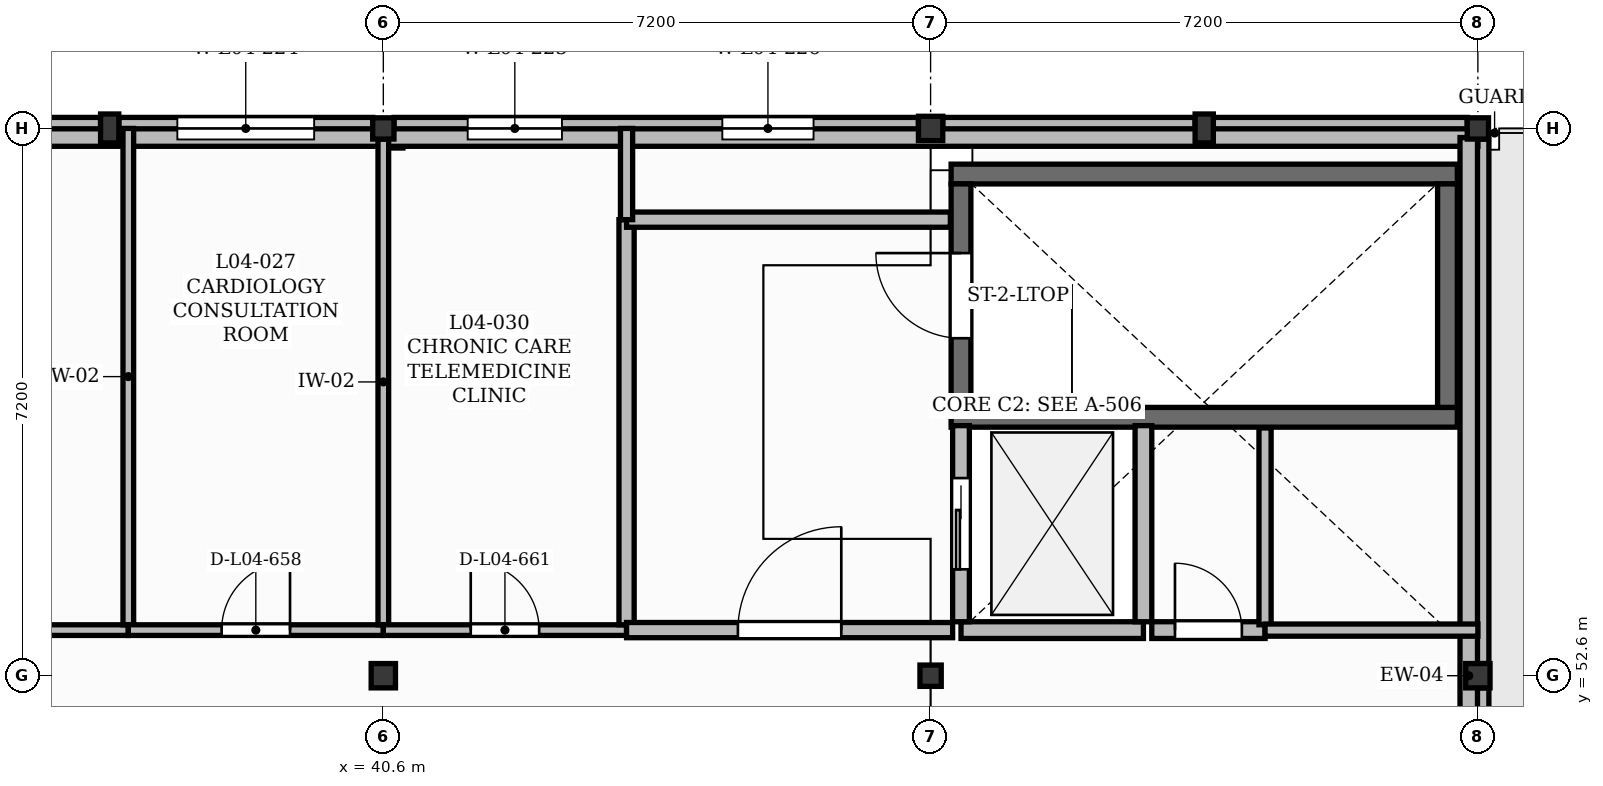
"""IFC4 building model, lengths in metres.
Left out: names, types, materials, properties, quantities, classifications, styles, units other than length and angle.
Written with IfcOpenShell. Run it as: python <this file> out.ifc"""

import sys

from ifc_helpers import new_model, si_unit, direction, frame, frame_2d, origin, origin_2d, place, context, subcontext, project, spatial, polyline, rectangle, outline, extrude, element, fill, save


model = new_model("IFC4")
c1 = context("Model", 3, precision=1e-05, world=origin(), true_north=direction((0.0, 1.0)))
c2 = subcontext(c1, "Body", "Model", "MODEL_VIEW")
j1 = project(units=[si_unit("LENGTHUNIT", "METRE"), si_unit("PLANEANGLEUNIT", "RADIAN")], contexts=[c1])
p1 = place(None, origin())
s1 = spatial("IfcSite", under=j1, at=p1, CompositionType="ELEMENT")
p2 = place(p1, origin())
s2 = spatial("IfcBuilding", under=s1, at=p2, CompositionType="ELEMENT")
p3 = place(p2, frame((0.0, 0.0, 17.4)))
s3 = spatial("IfcBuildingStorey", under=s2, at=p3, CompositionType="ELEMENT", Elevation=17.4)
p4 = place(p3, frame((40.6, 52.6, 0.0), z_axis=(0.0, 0.0, 1.0), x_axis=(1.0, 0.0, 0.0)))
e1 = element("IfcColumn", 1, at=p4, inside=s3, PredefinedType="COLUMN", context=c2, shape_type="SweptSolid", body=[
    extrude(rectangle(XDim=0.32, YDim=0.32, at=origin_2d()), origin(), (0.0, 0.0, 1.0), 3.95),
])
for number, where, z_axis, x_axis in (
    (2, (40.6, 59.8, 0.0), (0.0, 0.0, 1.0), (1.0, 0.0, 0.0)),
    (3, (47.8, 52.6, 0.0), (0.0, 0.0, 1.0), (1.0, 0.0, 0.0)),
):
    element("IfcColumn", number, at=place(p3, frame(where, z_axis=z_axis, x_axis=x_axis)), inside=s3, PredefinedType="COLUMN", context=c2, shape_type="SweptSolid", body=[
        extrude(rectangle(XDim=0.28, YDim=0.28, at=origin_2d()), origin(), (0.0, 0.0, 1.0), 3.95),
    ])
for number, where, z_axis, x_axis in (
    (4, (47.8, 59.8, 0.0), (0.0, 0.0, 1.0), (1.0, 0.0, 0.0)),
    (5, (55.0, 52.6, 0.0), (0.0, 0.0, 1.0), (1.0, 0.0, 0.0)),
):
    element("IfcColumn", number, at=place(p3, frame(where, z_axis=z_axis, x_axis=x_axis)), inside=s3, PredefinedType="COLUMN", context=c2, shape_type="SweptSolid", body=[
        extrude(rectangle(XDim=0.32, YDim=0.32, at=origin_2d()), origin(), (0.0, 0.0, 1.0), 3.95),
    ])
p5 = place(p3, frame((55.0, 59.8, 0.0), z_axis=(0.0, 0.0, 1.0), x_axis=(1.0, 0.0, 0.0)))
e6 = element("IfcColumn", 6, at=p5, inside=s3, PredefinedType="COLUMN", context=c2, shape_type="SweptSolid", body=[
    extrude(rectangle(XDim=0.28, YDim=0.28, at=origin_2d()), origin(), (0.0, 0.0, 1.0), 3.95),
])
for number, where, z_axis, x_axis in (
    (7, (37.0, 59.8, 0.0), (0.0, 0.0, 1.0), (1.0, 0.0, 0.0)),
    (8, (51.4, 59.8, 0.0), (0.0, 0.0, 1.0), (1.0, 0.0, 0.0)),
):
    element("IfcColumn", number, at=place(p3, frame(where, z_axis=z_axis, x_axis=x_axis)), inside=s3, PredefinedType="PILASTER", context=c2, shape_type="SweptSolid", body=[
        extrude(rectangle(XDim=0.24, YDim=0.38, at=origin_2d()), origin(), (0.0, 0.0, 1.0), 3.95),
    ])
p6 = place(p3, frame((33.56, 59.8, 0.0), z_axis=(0.0, 0.0, 1.0), x_axis=(1.0, 0.0, 0.0)))
e9 = element("IfcWall", 9, at=p6, inside=s3, PredefinedType="SOLIDWALL", context=c2, shape_type="SweptSolid", body=[
    extrude(rectangle(XDim=3.32, YDim=0.29, at=frame_2d((1.66, 0.0))), origin(), (0.0, 0.0, 1.0), 3.49),
])
p7 = place(p6, frame((0.83, 0.0, 1.0)))
e10 = element("IfcOpeningElement", 10, at=p7, cuts=e9, PredefinedType="OPENING", context=c2, shape_type="SweptSolid", body=[
    extrude(rectangle(XDim=1.66, YDim=1.8, at=frame_2d((0.83, 0.9))), frame((0.0, 0.155, 0.0), z_axis=(0.0, -1.0, 0.0), x_axis=(1.0, 0.0, 0.0)), (0.0, 0.0, 1.0), 0.31),
])
p8 = place(p3, frame((37.12, 59.8, 0.0), z_axis=(0.0, 0.0, 1.0), x_axis=(1.0, 0.0, 0.0)))
e11 = element("IfcWall", 11, at=p8, inside=s3, PredefinedType="SOLIDWALL", context=c2, shape_type="SweptSolid", body=[
    extrude(rectangle(XDim=3.34, YDim=0.29, at=frame_2d((1.67, 0.0))), origin(), (0.0, 0.0, 1.0), 3.49),
])
p9 = place(p8, frame((0.77, 0.0, 1.0)))
e12 = element("IfcOpeningElement", 12, at=p9, cuts=e11, PredefinedType="OPENING", context=c2, shape_type="SweptSolid", body=[
    extrude(rectangle(XDim=1.8, YDim=1.8, at=frame_2d((0.9, 0.9))), frame((0.0, 0.155, 0.0), z_axis=(0.0, -1.0, 0.0), x_axis=(1.0, 0.0, 0.0)), (0.0, 0.0, 1.0), 0.31),
])
p10 = place(p3, frame((40.74, 59.8, 0.0), z_axis=(0.0, 0.0, 1.0), x_axis=(1.0, 0.0, 0.0)))
e13 = element("IfcWall", 13, at=p10, inside=s3, PredefinedType="SOLIDWALL", context=c2, shape_type="SweptSolid", body=[
    extrude(rectangle(XDim=6.9, YDim=0.29, at=frame_2d((3.45, 0.0))), origin(), (0.0, 0.0, 1.0), 3.49),
])
p11 = place(p10, frame((0.97, 0.0, 1.0)))
e14 = element("IfcOpeningElement", 14, at=p11, cuts=e13, PredefinedType="OPENING", context=c2, shape_type="SweptSolid", body=[
    extrude(rectangle(XDim=1.24, YDim=1.8, at=frame_2d((0.62, 0.9))), frame((0.0, 0.155, 0.0), z_axis=(0.0, -1.0, 0.0), x_axis=(1.0, 0.0, 0.0)), (0.0, 0.0, 1.0), 0.31),
])
p12 = place(p10, frame((4.32, 0.0, 1.0)))
e15 = element("IfcOpeningElement", 15, at=p12, cuts=e13, PredefinedType="OPENING", context=c2, shape_type="SweptSolid", body=[
    extrude(rectangle(XDim=1.2, YDim=1.95, at=frame_2d((0.6, 0.975))), frame((0.0, 0.155, 0.0), z_axis=(0.0, -1.0, 0.0), x_axis=(1.0, 0.0, 0.0)), (0.0, 0.0, 1.0), 0.31),
])
p13 = place(p3, frame((55.0, 45.54, 0.0), z_axis=(0.0, 0.0, 1.0), x_axis=(0.0, 1.0, 0.0)))
e16 = element("IfcWall", 16, at=p13, inside=s3, PredefinedType="SOLIDWALL", context=c2, shape_type="SweptSolid", body=[
    extrude(rectangle(XDim=6.9, YDim=0.29, at=frame_2d((3.45, 0.0))), origin(), (0.0, 0.0, 1.0), 3.49),
])
p14 = place(p13, frame((2.85, 0.0, 0.0)))
e17 = element("IfcOpeningElement", 17, at=p14, cuts=e16, PredefinedType="OPENING", context=c2, shape_type="SweptSolid", body=[
    extrude(rectangle(XDim=1.2, YDim=2.25, at=frame_2d((0.6, 1.125))), frame((0.0, 0.155, 0.0), z_axis=(0.0, -1.0, 0.0), x_axis=(1.0, 0.0, 0.0)), (0.0, 0.0, 1.0), 0.31),
])
p15 = place(p13, frame((0.825, 0.0, 1.05)))
e18 = element("IfcOpeningElement", 18, at=p15, cuts=e16, PredefinedType="OPENING", context=c2, shape_type="SweptSolid", body=[
    extrude(rectangle(XDim=1.26, YDim=1.65, at=frame_2d((0.63, 0.825))), frame((0.0, 0.155, 0.0), z_axis=(0.0, -1.0, 0.0), x_axis=(1.0, 0.0, 0.0)), (0.0, 0.0, 1.0), 0.31),
])
p16 = place(p3, frame((47.96, 59.8, 0.0), z_axis=(0.0, 0.0, 1.0), x_axis=(1.0, 0.0, 0.0)))
e19 = element("IfcWall", 19, at=p16, inside=s3, PredefinedType="SOLIDWALL", context=c2, shape_type="SweptSolid", body=[
    extrude(rectangle(XDim=3.32, YDim=0.29, at=frame_2d((1.66, 0.0))), origin(), (0.0, 0.0, 1.0), 3.49),
])
p17 = place(p3, frame((51.52, 59.8, 0.0), z_axis=(0.0, 0.0, 1.0), x_axis=(1.0, 0.0, 0.0)))
e20 = element("IfcWall", 20, at=p17, inside=s3, PredefinedType="SOLIDWALL", context=c2, shape_type="SweptSolid", body=[
    extrude(rectangle(XDim=3.34, YDim=0.29, at=frame_2d((1.67, 0.0))), origin(), (0.0, 0.0, 1.0), 3.49),
])
p18 = place(p3, frame((55.0, 52.76, 0.0), z_axis=(0.0, 0.0, 1.0), x_axis=(0.0, 1.0, 0.0)))
e21 = element("IfcWall", 21, at=p18, inside=s3, PredefinedType="SOLIDWALL", context=c2, shape_type="SweptSolid", body=[
    extrude(rectangle(XDim=6.9, YDim=0.29, at=frame_2d((3.45, 0.0))), origin(), (0.0, 0.0, 1.0), 3.49),
])
p19 = place(p3, frame((4.6, 59.68, 4.2), z_axis=(0.0, 0.0, 1.0), x_axis=(1.0, 0.0, 0.0)))
e22 = element("IfcWall", 22, at=p19, inside=s3, PredefinedType="PARAPET", context=c2, shape_type="SweptSolid", body=[
    extrude(outline(polyline([(0.0, 0.0), (50.4, 0.0), (50.4, 0.65), (39.312, 0.925), (39.312, 0.65), (32.256, 1.2), (32.256, 0.925), (18.144, 1.2), (18.144, 0.925), (11.088, 0.925), (11.088, 0.65), (0.0, 0.65), (0.0, 0.0)])), frame((0.0, 0.115, 0.0), z_axis=(0.0, -1.0, 0.0), x_axis=(1.0, 0.0, 0.0)), (0.0, 0.0, 1.0), 0.23),
])
p20 = place(p3, frame((54.88, 45.52, 4.2), z_axis=(0.0, 0.0, 1.0), x_axis=(0.0, 1.0, 0.0)))
e23 = element("IfcWall", 23, at=p20, inside=s3, PredefinedType="PARAPET", context=c2, shape_type="SweptSolid", body=[
    extrude(outline(polyline([(0.0, 0.0), (14.16, 0.0), (14.16, 0.6), (11.045, 0.85), (11.045, 0.6), (9.062, 1.1), (9.062, 0.85), (5.098, 1.1), (5.098, 0.85), (3.115, 0.85), (3.115, 0.6), (0.0, 0.6), (0.0, 0.0)])), frame((0.0, 0.115, 0.0), z_axis=(0.0, -1.0, 0.0), x_axis=(1.0, 0.0, 0.0)), (0.0, 0.0, 1.0), 0.23),
])
for number, where, z_axis, x_axis in (
    (24, (48.07, 56.0, 0.0), (0.0, 0.0, 1.0), (1.0, 0.0, 0.0)),
    (25, (48.07, 59.2, 0.0), (0.0, 0.0, 1.0), (1.0, 0.0, 0.0)),
):
    element("IfcWall", number, at=place(p3, frame(where, z_axis=z_axis, x_axis=x_axis)), inside=s3, PredefinedType="SHEAR", context=c2, shape_type="SweptSolid", body=[
        extrude(rectangle(XDim=6.66, YDim=0.26, at=frame_2d((3.33, 0.0))), origin(), (0.0, 0.0, 1.0), 3.95),
    ])
p21 = place(p3, frame((48.2, 56.13, 0.0), z_axis=(0.0, 0.0, 1.0), x_axis=(0.0, 1.0, 0.0)))
e26 = element("IfcWall", 26, at=p21, inside=s3, PredefinedType="SHEAR", context=c2, shape_type="SweptSolid", body=[
    extrude(rectangle(XDim=2.94, YDim=0.26, at=frame_2d((1.47, 0.0))), origin(), (0.0, 0.0, 1.0), 3.95),
])
p22 = place(p21, frame((0.91, 0.0, 0.0)))
e27 = element("IfcOpeningElement", 27, at=p22, cuts=e26, PredefinedType="OPENING", context=c2, shape_type="SweptSolid", body=[
    extrude(rectangle(XDim=1.12, YDim=2.1, at=frame_2d((0.56, 1.05))), frame((0.0, 0.14, 0.0), z_axis=(0.0, -1.0, 0.0), x_axis=(1.0, 0.0, 0.0)), (0.0, 0.0, 1.0), 0.28),
])
p23 = place(p3, frame((54.6, 56.13, 0.0), z_axis=(0.0, 0.0, 1.0), x_axis=(0.0, 1.0, 0.0)))
e28 = element("IfcWall", 28, at=p23, inside=s3, PredefinedType="SHEAR", context=c2, shape_type="SweptSolid", body=[
    extrude(rectangle(XDim=2.94, YDim=0.26, at=frame_2d((1.47, 0.0))), origin(), (0.0, 0.0, 1.0), 3.95),
])
p24 = place(p3, frame((48.2, 53.2, 0.0), z_axis=(0.0, 0.0, 1.0), x_axis=(1.0, 0.0, 0.0)))
e29 = element("IfcWall", 29, at=p24, inside=s3, PredefinedType="SOLIDWALL", context=c2, shape_type="SweptSolid", body=[
    extrude(rectangle(XDim=2.4, YDim=0.22, at=frame_2d((1.2, 0.0))), origin(), (0.0, 0.0, 1.0), 3.95),
])
p25 = place(p3, frame((48.2, 53.31, 0.0), z_axis=(0.0, 0.0, 1.0), x_axis=(0.0, 1.0, 0.0)))
e30 = element("IfcWall", 30, at=p25, inside=s3, PredefinedType="SOLIDWALL", context=c2, shape_type="SweptSolid", body=[
    extrude(rectangle(XDim=2.58, YDim=0.22, at=frame_2d((1.29, 0.0))), origin(), (0.0, 0.0, 1.0), 3.95),
])
p26 = place(p25, frame((0.69, 0.0, 0.0)))
e31 = element("IfcOpeningElement", 31, at=p26, cuts=e30, PredefinedType="OPENING", context=c2, shape_type="SweptSolid", body=[
    extrude(rectangle(XDim=1.2, YDim=2.15, at=frame_2d((0.6, 1.075))), frame((0.0, 0.12, 0.0), z_axis=(0.0, -1.0, 0.0), x_axis=(1.0, 0.0, 0.0)), (0.0, 0.0, 1.0), 0.24),
])
p27 = place(p3, frame((50.6, 53.31, 0.0), z_axis=(0.0, 0.0, 1.0), x_axis=(0.0, 1.0, 0.0)))
e32 = element("IfcWall", 32, at=p27, inside=s3, PredefinedType="SOLIDWALL", context=c2, shape_type="SweptSolid", body=[
    extrude(rectangle(XDim=2.58, YDim=0.22, at=frame_2d((1.29, 0.0))), origin(), (0.0, 0.0, 1.0), 3.95),
])
p28 = place(p3, frame((33.4, 53.2, 0.0), z_axis=(0.0, 0.0, 1.0), x_axis=(1.0, 0.0, 0.0)))
e33 = element("IfcWall", 33, at=p28, inside=s3, PredefinedType="PARTITIONING", context=c2, shape_type="SweptSolid", body=[
    extrude(rectangle(XDim=3.845, YDim=0.14, at=frame_2d((1.923, 0.0))), origin(), (0.0, 0.0, 1.0), 3.93),
])
p29 = place(p28, frame((1.282, 0.0, 0.0)))
e34 = element("IfcOpeningElement", 34, at=p29, cuts=e33, PredefinedType="OPENING", context=c2, shape_type="SweptSolid", body=[
    extrude(rectangle(XDim=1.28, YDim=2.2, at=frame_2d((0.64, 1.1))), frame((0.0, 0.08, 0.0), z_axis=(0.0, -1.0, 0.0), x_axis=(1.0, 0.0, 0.0)), (0.0, 0.0, 1.0), 0.16),
])
p30 = place(p3, frame((37.245, 53.27, 0.0), z_axis=(0.0, 0.0, 1.0), x_axis=(0.0, 1.0, 0.0)))
e35 = element("IfcWall", 35, at=p30, inside=s3, PredefinedType="PARTITIONING", context=c2, shape_type="SweptSolid", body=[
    extrude(rectangle(XDim=6.53, YDim=0.14, at=frame_2d((3.265, 0.0))), origin(), (0.0, 0.0, 1.0), 3.93),
])
p31 = place(p3, frame((37.245, 53.2, 0.0), z_axis=(0.0, 0.0, 1.0), x_axis=(1.0, 0.0, 0.0)))
e36 = element("IfcWall", 36, at=p31, inside=s3, PredefinedType="PARTITIONING", context=c2, shape_type="SweptSolid", body=[
    extrude(rectangle(XDim=3.355, YDim=0.14, at=frame_2d((1.677, 0.0))), origin(), (0.0, 0.0, 1.0), 3.93),
])
p32 = place(p31, frame((1.228, 0.0, 0.0)))
e37 = element("IfcOpeningElement", 37, at=p32, cuts=e36, PredefinedType="OPENING", context=c2, shape_type="SweptSolid", body=[
    extrude(rectangle(XDim=0.9, YDim=2.1, at=frame_2d((0.45, 1.05))), frame((0.0, 0.08, 0.0), z_axis=(0.0, -1.0, 0.0), x_axis=(1.0, 0.0, 0.0)), (0.0, 0.0, 1.0), 0.16),
])
p33 = place(p3, frame((40.6, 53.27, 0.0), z_axis=(0.0, 0.0, 1.0), x_axis=(0.0, 1.0, 0.0)))
e38 = element("IfcWall", 38, at=p33, inside=s3, PredefinedType="PARTITIONING", context=c2, shape_type="SweptSolid", body=[
    extrude(rectangle(XDim=6.39, YDim=0.14, at=frame_2d((3.195, 0.0))), origin(), (0.0, 0.0, 1.0), 3.49),
])
p34 = place(p3, frame((40.6, 53.2, 0.0), z_axis=(0.0, 0.0, 1.0), x_axis=(1.0, 0.0, 0.0)))
e39 = element("IfcWall", 39, at=p34, inside=s3, PredefinedType="PARTITIONING", context=c2, shape_type="SweptSolid", body=[
    extrude(rectangle(XDim=3.2, YDim=0.14, at=frame_2d((1.6, 0.0))), origin(), (0.0, 0.0, 1.0), 3.93),
])
p35 = place(p34, frame((1.15, 0.0, 0.0)))
e40 = element("IfcOpeningElement", 40, at=p35, cuts=e39, PredefinedType="OPENING", context=c2, shape_type="SweptSolid", body=[
    extrude(rectangle(XDim=0.9, YDim=2.1, at=frame_2d((0.45, 1.05))), frame((0.0, 0.08, 0.0), z_axis=(0.0, -1.0, 0.0), x_axis=(1.0, 0.0, 0.0)), (0.0, 0.0, 1.0), 0.16),
])
p36 = place(p3, frame((43.8, 53.27, 0.0), z_axis=(0.0, 0.0, 1.0), x_axis=(0.0, 1.0, 0.0)))
e41 = element("IfcWall", 41, at=p36, inside=s3, PredefinedType="PARTITIONING", context=c2, shape_type="SweptSolid", body=[
    extrude(rectangle(XDim=5.33, YDim=0.2, at=frame_2d((2.665, 0.0))), origin(), (0.0, 0.0, 1.0), 3.93),
])
p37 = place(p3, frame((43.8, 53.2, 0.0), z_axis=(0.0, 0.0, 1.0), x_axis=(1.0, 0.0, 0.0)))
e42 = element("IfcWall", 42, at=p37, inside=s3, PredefinedType="PARTITIONING", context=c2, shape_type="SweptSolid", body=[
    extrude(rectangle(XDim=4.29, YDim=0.2, at=frame_2d((2.145, 0.0))), origin(), (0.0, 0.0, 1.0), 3.93),
])
p38 = place(p37, frame((1.465, 0.0, 0.0)))
e43 = element("IfcOpeningElement", 43, at=p38, cuts=e42, PredefinedType="OPENING", context=c2, shape_type="SweptSolid", body=[
    extrude(rectangle(XDim=1.36, YDim=2.2, at=frame_2d((0.68, 1.1))), frame((0.0, 0.11, 0.0), z_axis=(0.0, -1.0, 0.0), x_axis=(1.0, 0.0, 0.0)), (0.0, 0.0, 1.0), 0.22),
])
p39 = place(p3, frame((50.71, 53.2, 0.0), z_axis=(0.0, 0.0, 1.0), x_axis=(1.0, 0.0, 0.0)))
e44 = element("IfcWall", 44, at=p39, inside=s3, PredefinedType="SOLIDWALL", context=c2, shape_type="SweptSolid", body=[
    extrude(rectangle(XDim=1.49, YDim=0.22, at=frame_2d((0.745, 0.0))), origin(), (0.0, 0.0, 1.0), 3.93),
])
p40 = place(p39, frame((0.305, 0.0, 0.0)))
e45 = element("IfcOpeningElement", 45, at=p40, cuts=e44, PredefinedType="OPENING", context=c2, shape_type="SweptSolid", body=[
    extrude(rectangle(XDim=0.88, YDim=2.05, at=frame_2d((0.44, 1.025))), frame((0.0, 0.12, 0.0), z_axis=(0.0, -1.0, 0.0), x_axis=(1.0, 0.0, 0.0)), (0.0, 0.0, 1.0), 0.24),
])
p41 = place(p3, frame((52.2, 53.27, 0.0), z_axis=(0.0, 0.0, 1.0), x_axis=(0.0, 1.0, 0.0)))
e46 = element("IfcWall", 46, at=p41, inside=s3, PredefinedType="PARTITIONING", context=c2, shape_type="SweptSolid", body=[
    extrude(rectangle(XDim=2.59, YDim=0.16, at=frame_2d((1.295, 0.0))), origin(), (0.0, 0.0, 1.0), 3.93),
])
p42 = place(p3, frame((48.06, 58.6, 0.0), z_axis=(0.0, 0.0, 1.0), x_axis=(-1.0, 0.0, 0.0)))
e47 = element("IfcWall", 47, at=p42, inside=s3, PredefinedType="PARTITIONING", context=c2, shape_type="SweptSolid", body=[
    extrude(rectangle(XDim=4.26, YDim=0.2, at=frame_2d((2.13, 0.0))), origin(), (0.0, 0.0, 1.0), 3.93),
])
p43 = place(p3, frame((55.0, 53.2, 0.0), z_axis=(0.0, 0.0, 1.0), x_axis=(-1.0, 0.0, 0.0)))
e48 = element("IfcWall", 48, at=p43, inside=s3, PredefinedType="PARTITIONING", context=c2, shape_type="SweptSolid", body=[
    extrude(rectangle(XDim=2.8, YDim=0.16, at=frame_2d((1.4, 0.0))), origin(), (0.0, 0.0, 1.0), 3.93),
])
p44 = place(p3, frame((43.8, 58.6, 0.0), z_axis=(0.0, 0.0, 1.0), x_axis=(0.0, 1.0, 0.0)))
e49 = element("IfcWall", 49, at=p44, inside=s3, PredefinedType="PARTITIONING", context=c2, shape_type="SweptSolid", body=[
    extrude(rectangle(XDim=1.2, YDim=0.16, at=frame_2d((0.6, 0.0))), origin(), (0.0, 0.0, 1.0), 3.93),
])
p45 = place(p9, origin())
e50 = element("IfcWindow", 50, at=p45, inside=s3, PartitioningType="DOUBLE_PANEL_VERTICAL", PredefinedType="WINDOW", context=c2, shape_type="SweptSolid", body=[
    extrude(rectangle(XDim=1.8, YDim=1.8, at=frame_2d((0.9, 0.9))), frame((0.0, 0.03, 0.0), z_axis=(0.0, -1.0, 0.0), x_axis=(1.0, 0.0, 0.0)), (0.0, 0.0, 1.0), 0.06),
])
fill(e12, e50)
p46 = place(p11, origin())
e51 = element("IfcWindow", 51, at=p46, inside=s3, PartitioningType="SINGLE_PANEL", PredefinedType="WINDOW", context=c2, shape_type="SweptSolid", body=[
    extrude(rectangle(XDim=1.24, YDim=1.8, at=frame_2d((0.62, 0.9))), frame((0.0, 0.03, 0.0), z_axis=(0.0, -1.0, 0.0), x_axis=(1.0, 0.0, 0.0)), (0.0, 0.0, 1.0), 0.06),
])
fill(e14, e51)
p47 = place(p12, origin())
e52 = element("IfcWindow", 52, at=p47, inside=s3, PartitioningType="SINGLE_PANEL", PredefinedType="WINDOW", context=c2, shape_type="SweptSolid", body=[
    extrude(rectangle(XDim=1.2, YDim=1.95, at=frame_2d((0.6, 0.975))), frame((0.0, 0.03, 0.0), z_axis=(0.0, -1.0, 0.0), x_axis=(1.0, 0.0, 0.0)), (0.0, 0.0, 1.0), 0.06),
])
fill(e15, e52)
p48 = place(p26, origin())
e53 = element("IfcDoor", 53, at=p48, inside=s3, OperationType="SLIDING_TO_LEFT", PredefinedType="DOOR", context=c2, shape_type="SweptSolid", body=[
    extrude(rectangle(XDim=1.2, YDim=2.15, at=frame_2d((0.6, 1.075))), frame((0.0, 0.025, 0.0), z_axis=(0.0, -1.0, 0.0), x_axis=(1.0, 0.0, 0.0)), (0.0, 0.0, 1.0), 0.05),
])
fill(e31, e53)
p49 = place(p22, origin())
e54 = element("IfcDoor", 54, at=p49, inside=s3, OperationType="SINGLE_SWING_RIGHT", PredefinedType="DOOR", context=c2, shape_type="SweptSolid", body=[
    extrude(rectangle(XDim=1.12, YDim=2.1, at=frame_2d((0.56, 1.05))), frame((0.0, 0.025, 0.0), z_axis=(0.0, -1.0, 0.0), x_axis=(1.0, 0.0, 0.0)), (0.0, 0.0, 1.0), 0.05),
])
fill(e27, e54)
p50 = place(p38, origin())
e55 = element("IfcDoor", 55, at=p50, inside=s3, OperationType="SINGLE_SWING_RIGHT", PredefinedType="DOOR", context=c2, shape_type="SweptSolid", body=[
    extrude(rectangle(XDim=1.36, YDim=2.2, at=frame_2d((0.68, 1.1))), frame((0.0, 0.025, 0.0), z_axis=(0.0, -1.0, 0.0), x_axis=(1.0, 0.0, 0.0)), (0.0, 0.0, 1.0), 0.05),
])
fill(e43, e55)
p51 = place(p40, origin())
e56 = element("IfcDoor", 56, at=p51, inside=s3, OperationType="SINGLE_SWING_LEFT", PredefinedType="DOOR", context=c2, shape_type="SweptSolid", body=[
    extrude(rectangle(XDim=0.88, YDim=2.05, at=frame_2d((0.44, 1.025))), frame((0.0, 0.025, 0.0), z_axis=(0.0, -1.0, 0.0), x_axis=(1.0, 0.0, 0.0)), (0.0, 0.0, 1.0), 0.05),
])
fill(e45, e56)
p52 = place(p32, origin())
e57 = element("IfcDoor", 57, at=p52, inside=s3, OperationType="SINGLE_SWING_RIGHT", PredefinedType="DOOR", context=c2, shape_type="SweptSolid", body=[
    extrude(rectangle(XDim=0.9, YDim=2.1, at=frame_2d((0.45, 1.05))), frame((0.0, 0.025, 0.0), z_axis=(0.0, -1.0, 0.0), x_axis=(1.0, 0.0, 0.0)), (0.0, 0.0, 1.0), 0.05),
])
fill(e37, e57)
p53 = place(p35, origin())
e58 = element("IfcDoor", 58, at=p53, inside=s3, OperationType="SINGLE_SWING_LEFT", PredefinedType="DOOR", context=c2, shape_type="SweptSolid", body=[
    extrude(rectangle(XDim=0.9, YDim=2.1, at=frame_2d((0.45, 1.05))), frame((0.0, 0.025, 0.0), z_axis=(0.0, -1.0, 0.0), x_axis=(1.0, 0.0, 0.0)), (0.0, 0.0, 1.0), 0.05),
])
fill(e40, e58)
save(model, sys.argv[1])
